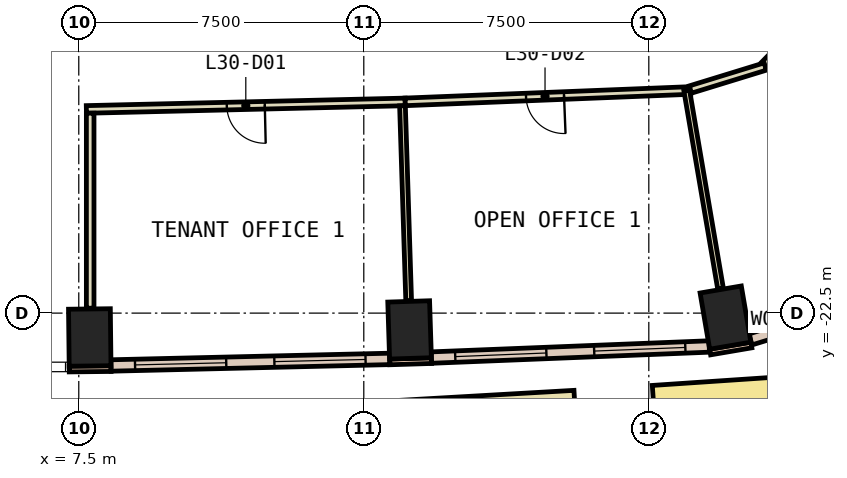
"""IFC4 building model, lengths in metres.
Left out: names, types, materials, properties, quantities, classifications, styles, units other than length and angle.
Written with IfcOpenShell. Run it as: python <this file> out.ifc"""

import sys

from ifc_helpers import new_model, si_unit, direction, frame, frame_2d, origin, origin_2d, place, context, subcontext, project, spatial, rectangle, extrude, element, fill, save


model = new_model("IFC4")
c1 = context("Model", 3, precision=1e-05, world=origin(), true_north=direction((0.0, 1.0)))
c2 = subcontext(c1, "Body", "Model", "MODEL_VIEW")
j1 = project(units=[si_unit("LENGTHUNIT", "METRE"), si_unit("PLANEANGLEUNIT", "RADIAN")], contexts=[c1])
p1 = place(None, origin())
s1 = spatial("IfcSite", under=j1, at=p1, CompositionType="ELEMENT")
p2 = place(p1, origin())
s2 = spatial("IfcBuilding", under=s1, at=p2, CompositionType="ELEMENT")
p3 = place(p2, frame((0.0, 0.0, 138.2)))
s3 = spatial("IfcBuildingStorey", under=s2, at=p3, CompositionType="ELEMENT", Elevation=138.2)
for number, where, z_axis, x_axis in (
    (1, (7.789, -23.141, 0.0), (0.0, 0.0, 1.0), (1.0, 0.012, 0.0)),
    (2, (16.205, -22.942, 0.0), (0.0, 0.0, 1.0), (0.999, 0.032, 0.0)),
    (3, (24.518, -22.618, 0.0), (0.0, 0.0, 1.0), (0.986, 0.168, 0.0)),
):
    element("IfcColumn", number, at=place(p3, frame(where, z_axis=z_axis, x_axis=x_axis)), inside=s3, PredefinedType="COLUMN", context=c2, shape_type="SweptSolid", body=[
        extrude(rectangle(XDim=1.1, YDim=1.5, at=origin_2d()), origin(), (0.0, 0.0, 1.0), 3.8),
    ])
p4 = place(p3, frame((7.249, -23.972, 0.0), z_axis=(0.0, 0.0, 1.0), x_axis=(0.999940879068, 0.010873746799, 0.0)))
e4 = element("IfcWall", 4, at=p4, inside=s3, PredefinedType="STANDARD", context=c2, shape_type="SweptSolid", body=[
    extrude(rectangle(XDim=1.1, YDim=0.15, at=frame_2d((0.55, 0.0))), origin(), (0.0, 0.0, 1.0), 3.8),
])
p5 = place(p3, frame((15.682, -23.784, 0.0), z_axis=(0.0, 0.0, 1.0), x_axis=(0.999523702549, 0.030860460829, 0.0)))
e5 = element("IfcWall", 5, at=p5, inside=s3, PredefinedType="STANDARD", context=c2, shape_type="SweptSolid", body=[
    extrude(rectangle(XDim=1.1, YDim=0.15, at=frame_2d((0.55, 0.0))), origin(), (0.0, 0.0, 1.0), 3.8),
])
p6 = place(p3, frame((24.114, -23.524, 0.0), z_axis=(0.0, 0.0, 1.0), x_axis=(0.985800082077, 0.167923191299, 0.0)))
e6 = element("IfcWall", 6, at=p6, inside=s3, PredefinedType="STANDARD", context=c2, shape_type="SweptSolid", body=[
    extrude(rectangle(XDim=1.101, YDim=0.15, at=frame_2d((0.55, 0.0))), origin(), (0.0, 0.0, 1.0), 3.8),
])
p7 = place(p3, frame((8.347, -23.878, 0.0), z_axis=(0.0, 0.0, 1.0), x_axis=(0.999722302867, 0.023565168146, 0.0)))
e7 = element("IfcWall", 7, at=p7, inside=s3, PredefinedType="STANDARD", context=c2, shape_type="SweptSolid", body=[
    extrude(rectangle(XDim=7.335, YDim=0.3, at=frame_2d((3.667, 0.0))), origin(), (0.0, 0.0, 1.0), 3.8),
])
p8 = place(p7, frame((0.634, 0.0, 0.9)))
e8 = element("IfcOpeningElement", 8, at=p8, cuts=e7, PredefinedType="OPENING", context=c2, shape_type="SweptSolid", body=[
    extrude(rectangle(XDim=2.4, YDim=2.6, at=frame_2d((1.2, 1.3))), frame((0.0, 0.16, 0.0), z_axis=(0.0, -1.0, 0.0), x_axis=(1.0, 0.0, 0.0)), (0.0, 0.0, 1.0), 0.32),
])
p9 = place(p7, frame((4.301, 0.0, 0.9)))
e9 = element("IfcOpeningElement", 9, at=p9, cuts=e7, PredefinedType="OPENING", context=c2, shape_type="SweptSolid", body=[
    extrude(rectangle(XDim=2.4, YDim=2.6, at=frame_2d((1.2, 1.3))), frame((0.0, 0.16, 0.0), z_axis=(0.0, -1.0, 0.0), x_axis=(1.0, 0.0, 0.0)), (0.0, 0.0, 1.0), 0.32),
])
p10 = place(p3, frame((16.778, -23.67, 0.0), z_axis=(0.0, 0.0, 1.0), x_axis=(0.999203621229, 0.039901420066, 0.0)))
e10 = element("IfcWall", 10, at=p10, inside=s3, PredefinedType="STANDARD", context=c2, shape_type="SweptSolid", body=[
    extrude(rectangle(XDim=7.318, YDim=0.3, at=frame_2d((3.659, 0.0))), origin(), (0.0, 0.0, 1.0), 3.8),
])
p11 = place(p10, frame((0.629, 0.0, 0.9)))
e11 = element("IfcOpeningElement", 11, at=p11, cuts=e10, PredefinedType="OPENING", context=c2, shape_type="SweptSolid", body=[
    extrude(rectangle(XDim=2.4, YDim=2.6, at=frame_2d((1.2, 1.3))), frame((0.0, 0.16, 0.0), z_axis=(0.0, -1.0, 0.0), x_axis=(1.0, 0.0, 0.0)), (0.0, 0.0, 1.0), 0.32),
])
p12 = place(p10, frame((4.288, 0.0, 0.9)))
e12 = element("IfcOpeningElement", 12, at=p12, cuts=e10, PredefinedType="OPENING", context=c2, shape_type="SweptSolid", body=[
    extrude(rectangle(XDim=2.4, YDim=2.6, at=frame_2d((1.2, 1.3))), frame((0.0, 0.16, 0.0), z_axis=(0.0, -1.0, 0.0), x_axis=(1.0, 0.0, 0.0)), (0.0, 0.0, 1.0), 0.32),
])
p13 = place(p3, frame((25.173, -23.193, 0.0), z_axis=(0.0, 0.0, 1.0), x_axis=(0.955874475611, 0.293775402094, 0.0)))
e13 = element("IfcWall", 13, at=p13, inside=s3, PredefinedType="STANDARD", context=c2, shape_type="SweptSolid", body=[
    extrude(rectangle(XDim=3.537, YDim=0.3, at=frame_2d((1.769, 0.0))), origin(), (0.0, 0.0, 1.0), 3.8),
])
p14 = place(p13, frame((1.069, 0.0, 0.9)))
e14 = element("IfcOpeningElement", 14, at=p14, cuts=e13, PredefinedType="OPENING", context=c2, shape_type="SweptSolid", body=[
    extrude(rectangle(XDim=1.4, YDim=2.6, at=frame_2d((0.7, 1.3))), frame((0.0, 0.16, 0.0), z_axis=(0.0, -1.0, 0.0), x_axis=(1.0, 0.0, 0.0)), (0.0, 0.0, 1.0), 0.32),
])
p15 = place(p3, frame((15.689, -25.762, 0.0), z_axis=(0.0, 0.0, 1.0), x_axis=(0.998356963314, 0.057300731264, 0.0)))
e15 = element("IfcWall", 15, at=p15, inside=s3, PredefinedType="STANDARD", context=c2, shape_type="SweptSolid", body=[
    extrude(rectangle(XDim=4.904, YDim=1.9, at=frame_2d((2.452, 0.0))), origin(), (0.0, 0.0, 1.0), 0.8),
])
p16 = place(p3, frame((22.656, -25.351, 0.0), z_axis=(0.0, 0.0, 1.0), x_axis=(0.997736026517, 0.067251924811, 0.0)))
e16 = element("IfcWall", 16, at=p16, inside=s3, PredefinedType="STANDARD", context=c2, shape_type="SweptSolid", body=[
    extrude(rectangle(XDim=4.908, YDim=1.9, at=frame_2d((2.454, 0.0))), origin(), (0.0, 0.0, 1.0), 0.8),
])
p17 = place(p3, frame((16.09, -16.943, 0.0), z_axis=(0.0, 0.0, 1.0), x_axis=(-0.999721662071, -0.023592337425, 0.0)))
e17 = element("IfcWall", 17, at=p17, inside=s3, PredefinedType="PARTITIONING", context=c2, shape_type="SweptSolid", body=[
    extrude(rectangle(XDim=8.393, YDim=0.2, at=frame_2d((4.196, 0.0))), origin(), (0.0, 0.0, 1.0), 3.8),
])
p18 = place(p17, frame((3.696, 0.0, 0.0)))
e18 = element("IfcOpeningElement", 18, at=p18, cuts=e17, PredefinedType="OPENING", context=c2, shape_type="SweptSolid", body=[
    extrude(rectangle(XDim=1.0, YDim=2.1, at=frame_2d((0.5, 1.05))), frame((0.0, 0.11, 0.0), z_axis=(0.0, -1.0, 0.0), x_axis=(1.0, 0.0, 0.0)), (0.0, 0.0, 1.0), 0.22),
])
p19 = place(p3, frame((23.598, -16.642, 0.0), z_axis=(0.0, 0.0, 1.0), x_axis=(-0.999203655486, -0.039900562205, 0.0)))
e19 = element("IfcWall", 19, at=p19, inside=s3, PredefinedType="PARTITIONING", context=c2, shape_type="SweptSolid", body=[
    extrude(rectangle(XDim=7.514, YDim=0.2, at=frame_2d((3.757, 0.0))), origin(), (0.0, 0.0, 1.0), 3.8),
])
p20 = place(p19, frame((3.332, 0.0, 0.0)))
e20 = element("IfcOpeningElement", 20, at=p20, cuts=e19, PredefinedType="OPENING", context=c2, shape_type="SweptSolid", body=[
    extrude(rectangle(XDim=1.0, YDim=2.1, at=frame_2d((0.5, 1.05))), frame((0.0, 0.11, 0.0), z_axis=(0.0, -1.0, 0.0), x_axis=(1.0, 0.0, 0.0)), (0.0, 0.0, 1.0), 0.22),
])
p21 = place(p3, frame((26.373, -15.114, 0.0), z_axis=(0.0, 0.0, 1.0), x_axis=(-0.698272822523, -0.715831729756, 0.0)))
e21 = element("IfcWall", 21, at=p21, inside=s3, PredefinedType="PARTITIONING", context=c2, shape_type="SweptSolid", body=[
    extrude(rectangle(XDim=1.196, YDim=0.2, at=frame_2d((0.598, 0.0))), origin(), (0.0, 0.0, 1.0), 3.8),
])
p22 = place(p3, frame((25.563, -16.012, 0.0), z_axis=(0.0, 0.0, 1.0), x_axis=(-0.955896815358, -0.293702704087, 0.0)))
e22 = element("IfcWall", 22, at=p22, inside=s3, PredefinedType="PARTITIONING", context=c2, shape_type="SweptSolid", body=[
    extrude(rectangle(XDim=2.06, YDim=0.2, at=frame_2d((1.03, 0.0))), origin(), (0.0, 0.0, 1.0), 3.8),
])
p23 = place(p3, frame((7.8, -17.239, 0.0), z_axis=(0.0, 0.0, 1.0), x_axis=(0.0, -1.0, 0.0)))
e23 = element("IfcWall", 23, at=p23, inside=s3, PredefinedType="PARTITIONING", context=c2, shape_type="SweptSolid", body=[
    extrude(rectangle(XDim=5.132, YDim=0.2, at=frame_2d((2.566, 0.0))), origin(), (0.0, 0.0, 1.0), 3.8),
])
p24 = place(p3, frame((16.018, -17.045, 0.0), z_axis=(0.0, 0.0, 1.0), x_axis=(0.031744385759, -0.999496019988, 0.0)))
e24 = element("IfcWall", 24, at=p24, inside=s3, PredefinedType="PARTITIONING", context=c2, shape_type="SweptSolid", body=[
    extrude(rectangle(XDim=5.13, YDim=0.15, at=frame_2d((2.565, 0.0))), origin(), (0.0, 0.0, 1.0), 3.8),
])
p25 = place(p3, frame((23.498, -16.646, 0.0), z_axis=(0.0, 0.0, 1.0), x_axis=(0.168275674737, -0.985739974482, 0.0)))
e25 = element("IfcWall", 25, at=p25, inside=s3, PredefinedType="PARTITIONING", context=c2, shape_type="SweptSolid", body=[
    extrude(rectangle(XDim=5.288, YDim=0.15, at=frame_2d((2.644, 0.0))), origin(), (0.0, 0.0, 1.0), 3.8),
])
p26 = place(p8, origin())
e26 = element("IfcWindow", 26, at=p26, inside=s3, PartitioningType="SINGLE_PANEL", PredefinedType="WINDOW", context=c2, shape_type="SweptSolid", body=[
    extrude(rectangle(XDim=2.4, YDim=2.6, at=frame_2d((1.2, 1.3))), frame((0.0, 0.03, 0.0), z_axis=(0.0, -1.0, 0.0), x_axis=(1.0, 0.0, 0.0)), (0.0, 0.0, 1.0), 0.06),
])
fill(e8, e26)
p27 = place(p9, origin())
e27 = element("IfcWindow", 27, at=p27, inside=s3, PartitioningType="SINGLE_PANEL", PredefinedType="WINDOW", context=c2, shape_type="SweptSolid", body=[
    extrude(rectangle(XDim=2.4, YDim=2.6, at=frame_2d((1.2, 1.3))), frame((0.0, 0.03, 0.0), z_axis=(0.0, -1.0, 0.0), x_axis=(1.0, 0.0, 0.0)), (0.0, 0.0, 1.0), 0.06),
])
fill(e9, e27)
p28 = place(p11, origin())
e28 = element("IfcWindow", 28, at=p28, inside=s3, PartitioningType="SINGLE_PANEL", PredefinedType="WINDOW", context=c2, shape_type="SweptSolid", body=[
    extrude(rectangle(XDim=2.4, YDim=2.6, at=frame_2d((1.2, 1.3))), frame((0.0, 0.03, 0.0), z_axis=(0.0, -1.0, 0.0), x_axis=(1.0, 0.0, 0.0)), (0.0, 0.0, 1.0), 0.06),
])
fill(e11, e28)
p29 = place(p12, origin())
e29 = element("IfcWindow", 29, at=p29, inside=s3, PartitioningType="SINGLE_PANEL", PredefinedType="WINDOW", context=c2, shape_type="SweptSolid", body=[
    extrude(rectangle(XDim=2.4, YDim=2.6, at=frame_2d((1.2, 1.3))), frame((0.0, 0.03, 0.0), z_axis=(0.0, -1.0, 0.0), x_axis=(1.0, 0.0, 0.0)), (0.0, 0.0, 1.0), 0.06),
])
fill(e12, e29)
p30 = place(p18, origin())
e30 = element("IfcDoor", 30, at=p30, inside=s3, OperationType="SINGLE_SWING_RIGHT", PredefinedType="DOOR", context=c2, shape_type="SweptSolid", body=[
    extrude(rectangle(XDim=1.0, YDim=2.1, at=frame_2d((0.5, 1.05))), frame((0.0, 0.025, 0.0), z_axis=(0.0, -1.0, 0.0), x_axis=(1.0, 0.0, 0.0)), (0.0, 0.0, 1.0), 0.05),
])
fill(e18, e30)
p31 = place(p20, origin())
e31 = element("IfcDoor", 31, at=p31, inside=s3, OperationType="SINGLE_SWING_LEFT", PredefinedType="DOOR", context=c2, shape_type="SweptSolid", body=[
    extrude(rectangle(XDim=1.0, YDim=2.1, at=frame_2d((0.5, 1.05))), frame((0.0, 0.025, 0.0), z_axis=(0.0, -1.0, 0.0), x_axis=(1.0, 0.0, 0.0)), (0.0, 0.0, 1.0), 0.05),
])
fill(e20, e31)
save(model, sys.argv[1])
